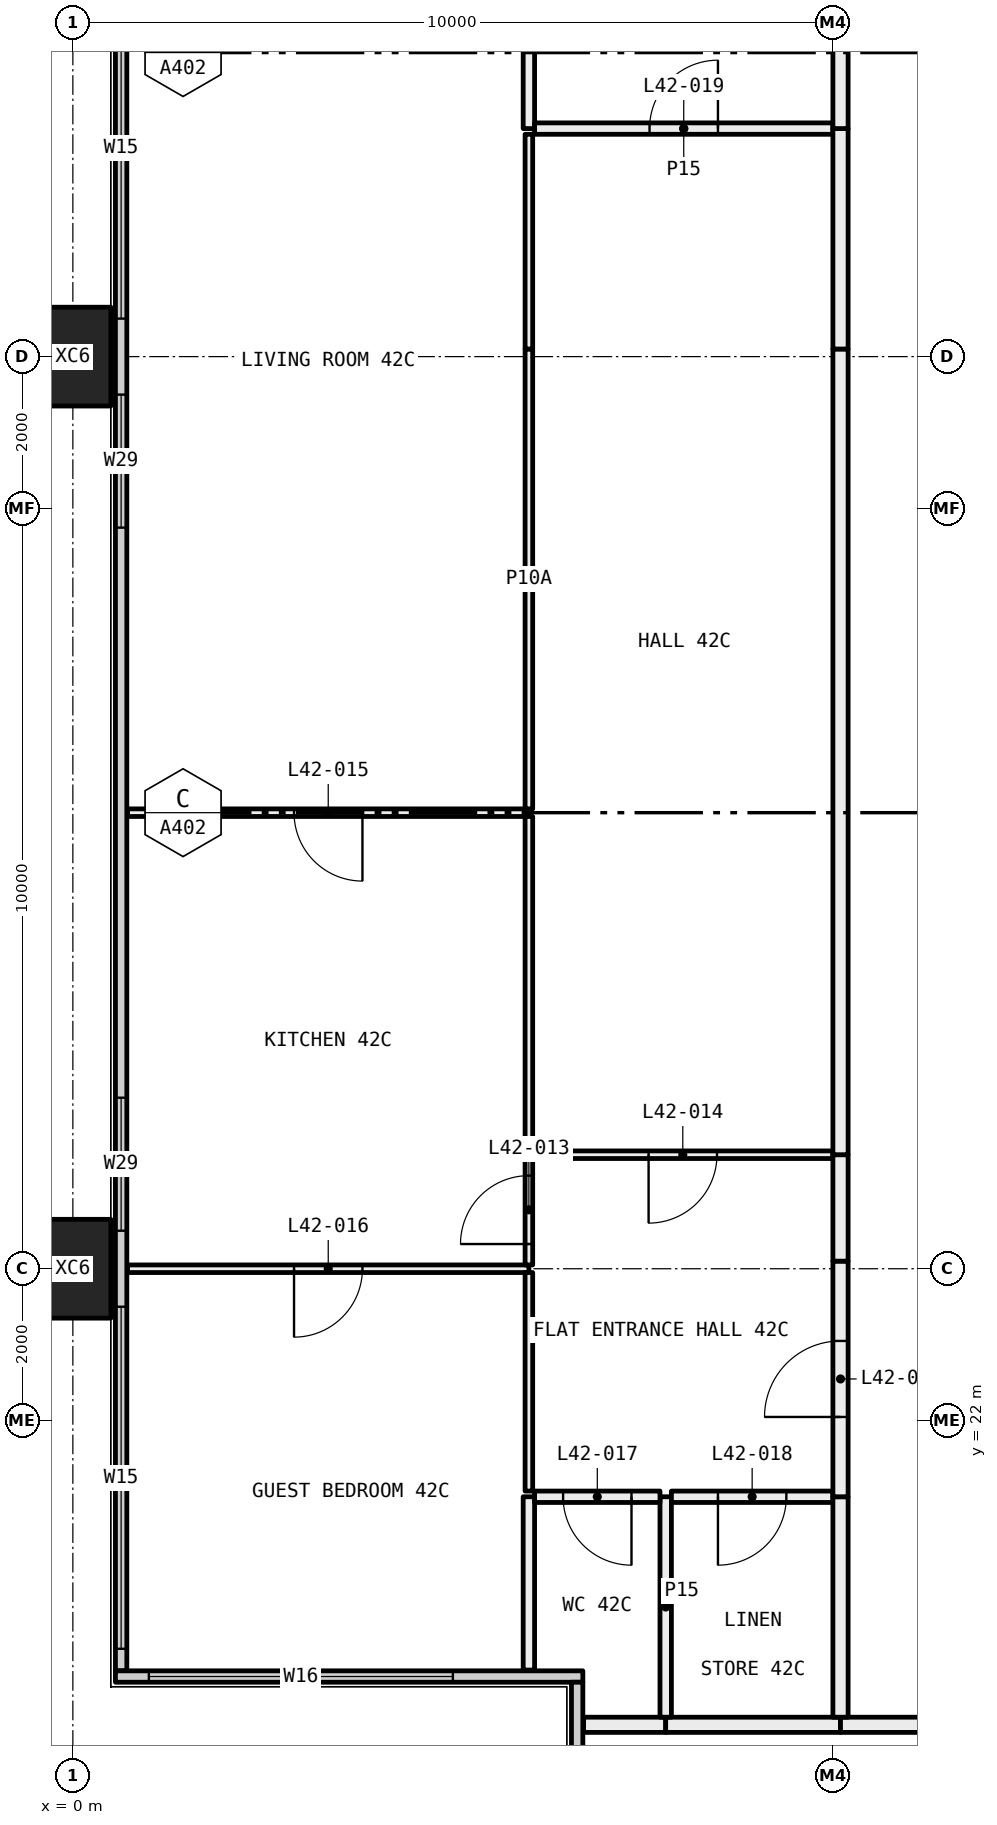
"""IFC4 building model, lengths in metres.
Left out: names, types, materials, properties, quantities, classifications, styles, units other than length and angle.
Written with IfcOpenShell. Run it as: python <this file> out.ifc"""

import sys

from ifc_helpers import new_model, si_unit, direction, frame, frame_2d, origin, origin_2d, place, context, subcontext, project, spatial, rectangle, hollow_rectangle, extrude, element, fill, save


model = new_model("IFC4")
c1 = context("Model", 3, precision=1e-05, world=origin(), true_north=direction((0.0, 1.0)))
c2 = subcontext(c1, "Body", "Model", "MODEL_VIEW")
j1 = project(units=[si_unit("LENGTHUNIT", "METRE"), si_unit("PLANEANGLEUNIT", "RADIAN")], contexts=[c1])
p1 = place(None, origin())
s1 = spatial("IfcSite", under=j1, at=p1, CompositionType="ELEMENT")
p2 = place(p1, origin())
s2 = spatial("IfcBuilding", under=s1, at=p2, CompositionType="ELEMENT")
p3 = place(p2, frame((0.0, 0.0, 161.7)))
s3 = spatial("IfcBuildingStorey", under=s2, at=p3, CompositionType="ELEMENT", Elevation=161.7)
for number, where, z_axis, x_axis in (
    (1, (0.0, 24.0, -0.4), (0.0, 0.0, 1.0), (0.0, 1.0, 0.0)),
    (2, (0.0, 36.0, -0.4), (0.0, 0.0, 1.0), (0.0, 1.0, 0.0)),
):
    element("IfcColumn", number, at=place(p3, frame(where, z_axis=z_axis, x_axis=x_axis)), inside=s3, PredefinedType="COLUMN", context=c2, shape_type="SweptSolid", body=[
        extrude(hollow_rectangle(XDim=1.3, YDim=1.0, WallThickness=0.05, at=origin_2d()), origin(), (0.0, 0.0, 1.0), 3.45),
    ])
p4 = place(p3, frame((0.635, 18.71, 0.0), z_axis=(0.0, 0.0, 1.0), x_axis=(0.0, 1.0, 0.0)))
e3 = element("IfcWall", 3, at=p4, inside=s3, PredefinedType="ELEMENTEDWALL", context=c2, shape_type="SweptSolid", body=[
    extrude(rectangle(XDim=22.58, YDim=0.15, at=frame_2d((11.29, 0.0))), origin(), (0.0, 0.0, 1.0), 3.05),
])
p5 = place(p4, frame((0.29, 0.0, 0.45)))
e4 = element("IfcOpeningElement", 4, at=p5, cuts=e3, PredefinedType="OPENING", context=c2, shape_type="SweptSolid", body=[
    extrude(rectangle(XDim=4.5, YDim=2.55, at=frame_2d((2.25, 1.275))), frame((0.0, 0.085, 0.0), z_axis=(0.0, -1.0, 0.0), x_axis=(1.0, 0.0, 0.0)), (0.0, 0.0, 1.0), 0.17),
])
p6 = place(p4, frame((5.79, 0.0, 0.45)))
e5 = element("IfcOpeningElement", 5, at=p6, cuts=e3, PredefinedType="OPENING", context=c2, shape_type="SweptSolid", body=[
    extrude(rectangle(XDim=1.75, YDim=2.55, at=frame_2d((0.875, 1.275))), frame((0.0, 0.085, 0.0), z_axis=(0.0, -1.0, 0.0), x_axis=(1.0, 0.0, 0.0)), (0.0, 0.0, 1.0), 0.17),
])
p7 = place(p4, frame((15.04, 0.0, 0.45)))
e6 = element("IfcOpeningElement", 6, at=p7, cuts=e3, PredefinedType="OPENING", context=c2, shape_type="SweptSolid", body=[
    extrude(rectangle(XDim=1.75, YDim=2.55, at=frame_2d((0.875, 1.275))), frame((0.0, 0.085, 0.0), z_axis=(0.0, -1.0, 0.0), x_axis=(1.0, 0.0, 0.0)), (0.0, 0.0, 1.0), 0.17),
])
p8 = place(p4, frame((17.79, 0.0, 0.45)))
e7 = element("IfcOpeningElement", 7, at=p8, cuts=e3, PredefinedType="OPENING", context=c2, shape_type="SweptSolid", body=[
    extrude(rectangle(XDim=4.5, YDim=2.55, at=frame_2d((2.25, 1.275))), frame((0.0, 0.085, 0.0), z_axis=(0.0, -1.0, 0.0), x_axis=(1.0, 0.0, 0.0)), (0.0, 0.0, 1.0), 0.17),
])
p9 = place(p3, frame((0.56, 18.635, 0.0), z_axis=(0.0, 0.0, 1.0), x_axis=(1.0, 0.0, 0.0)))
e8 = element("IfcWall", 8, at=p9, inside=s3, PredefinedType="ELEMENTEDWALL", context=c2, shape_type="SweptSolid", body=[
    extrude(rectangle(XDim=6.15, YDim=0.15, at=frame_2d((3.075, 0.0))), origin(), (0.0, 0.0, 1.0), 3.05),
])
p10 = place(p9, frame((0.44, 0.0, 0.45)))
e9 = element("IfcOpeningElement", 9, at=p10, cuts=e8, PredefinedType="OPENING", context=c2, shape_type="SweptSolid", body=[
    extrude(rectangle(XDim=4.0, YDim=2.55, at=frame_2d((2.0, 1.275))), frame((0.0, 0.085, 0.0), z_axis=(0.0, -1.0, 0.0), x_axis=(1.0, 0.0, 0.0)), (0.0, 0.0, 1.0), 0.17),
])
p11 = place(p3, frame((6.635, 12.71, 0.0), z_axis=(0.0, 0.0, 1.0), x_axis=(0.0, 1.0, 0.0)))
e10 = element("IfcWall", 10, at=p11, inside=s3, PredefinedType="ELEMENTEDWALL", context=c2, shape_type="SweptSolid", body=[
    extrude(rectangle(XDim=5.85, YDim=0.15, at=frame_2d((2.925, 0.0))), origin(), (0.0, 0.0, 1.0), 3.05),
])
p12 = place(p11, frame((0.29, 0.0, 0.45)))
e11 = element("IfcOpeningElement", 11, at=p12, cuts=e10, PredefinedType="OPENING", context=c2, shape_type="SweptSolid", body=[
    extrude(rectangle(XDim=4.0, YDim=2.55, at=frame_2d((2.0, 1.275))), frame((0.0, 0.085, 0.0), z_axis=(0.0, -1.0, 0.0), x_axis=(1.0, 0.0, 0.0)), (0.0, 0.0, 1.0), 0.17),
])
p13 = place(p3, frame((7.8, 18.0, 0.0), z_axis=(0.0, 0.0, 1.0), x_axis=(-1.0, 0.0, 0.0)))
e12 = element("IfcWall", 12, at=p13, inside=s3, PredefinedType="PARTITIONING", context=c2, shape_type="SweptSolid", body=[
    extrude(rectangle(XDim=1.08, YDim=0.2, at=frame_2d((0.54, 0.0))), origin(), (0.0, 0.0, 1.0), 3.05),
])
p14 = place(p3, frame((10.1, 18.0, 0.0), z_axis=(0.0, 0.0, 1.0), x_axis=(-1.0, 0.0, 0.0)))
e13 = element("IfcWall", 13, at=p14, inside=s3, PredefinedType="PARTITIONING", context=c2, shape_type="SweptSolid", body=[
    extrude(rectangle(XDim=2.3, YDim=0.2, at=frame_2d((1.15, 0.0))), origin(), (0.0, 0.0, 1.0), 3.05),
])
p15 = place(p3, frame((12.0, 18.0, 0.0), z_axis=(0.0, 0.0, 1.0), x_axis=(-1.0, 0.0, 0.0)))
e14 = element("IfcWall", 14, at=p15, inside=s3, PredefinedType="PARTITIONING", context=c2, shape_type="SweptSolid", body=[
    extrude(rectangle(XDim=1.9, YDim=0.2, at=frame_2d((0.95, 0.0))), origin(), (0.0, 0.0, 1.0), 3.05),
])
p16 = place(p3, frame((6.0, 24.0, 0.0), z_axis=(0.0, 0.0, 1.0), x_axis=(-1.0, 0.0, 0.0)))
e15 = element("IfcWall", 15, at=p16, inside=s3, PredefinedType="PARTITIONING", context=c2, shape_type="SweptSolid", body=[
    extrude(rectangle(XDim=5.28, YDim=0.1, at=frame_2d((2.64, 0.0))), origin(), (0.0, 0.0, 1.0), 2.45),
])
p17 = place(p16, frame((2.19, 0.0, 0.0)))
e16 = element("IfcOpeningElement", 16, at=p17, cuts=e15, PredefinedType="OPENING", context=c2, shape_type="SweptSolid", body=[
    extrude(rectangle(XDim=0.9, YDim=2.1, at=frame_2d((0.45, 1.05))), frame((0.0, 0.06, 0.0), z_axis=(0.0, -1.0, 0.0), x_axis=(1.0, 0.0, 0.0)), (0.0, 0.0, 1.0), 0.12),
])
p18 = place(p3, frame((6.0, 18.72, 0.0), z_axis=(0.0, 0.0, 1.0), x_axis=(0.0, 1.0, 0.0)))
e17 = element("IfcWall", 17, at=p18, inside=s3, PredefinedType="PARTITIONING", context=c2, shape_type="SweptSolid", body=[
    extrude(rectangle(XDim=2.28, YDim=0.15, at=frame_2d((1.14, 0.0))), origin(), (0.0, 0.0, 1.0), 3.05),
])
p19 = place(p3, frame((6.0, 21.075, 0.0), z_axis=(0.0, 0.0, 1.0), x_axis=(0.0, 1.0, 0.0)))
e18 = element("IfcWall", 18, at=p19, inside=s3, PredefinedType="PARTITIONING", context=c2, shape_type="SweptSolid", body=[
    extrude(rectangle(XDim=2.875, YDim=0.1, at=frame_2d((1.438, 0.0))), origin(), (0.0, 0.0, 1.0), 2.45),
])
p20 = place(p3, frame((6.0, 30.0, 0.0), z_axis=(0.0, 0.0, 1.0), x_axis=(-1.0, 0.0, 0.0)))
e19 = element("IfcWall", 19, at=p20, inside=s3, PredefinedType="PARTITIONING", context=c2, shape_type="SweptSolid", body=[
    extrude(rectangle(XDim=5.28, YDim=0.1, at=frame_2d((2.64, 0.0))), origin(), (0.0, 0.0, 1.0), 3.05),
])
p21 = place(p20, frame((2.19, 0.0, 0.0)))
e20 = element("IfcOpeningElement", 20, at=p21, cuts=e19, PredefinedType="OPENING", context=c2, shape_type="SweptSolid", body=[
    extrude(rectangle(XDim=0.9, YDim=2.1, at=frame_2d((0.45, 1.05))), frame((0.0, 0.06, 0.0), z_axis=(0.0, -1.0, 0.0), x_axis=(1.0, 0.0, 0.0)), (0.0, 0.0, 1.0), 0.12),
])
p22 = place(p3, frame((6.0, 24.05, 0.0), z_axis=(0.0, 0.0, 1.0), x_axis=(0.0, 1.0, 0.0)))
e21 = element("IfcWall", 21, at=p22, inside=s3, PredefinedType="PARTITIONING", context=c2, shape_type="SweptSolid", body=[
    extrude(rectangle(XDim=1.45, YDim=0.1, at=frame_2d((0.725, 0.0))), origin(), (0.0, 0.0, 1.0), 2.45),
])
p23 = place(p22, frame((0.275, 0.0, 0.0)))
e22 = element("IfcOpeningElement", 22, at=p23, cuts=e21, PredefinedType="OPENING", context=c2, shape_type="SweptSolid", body=[
    extrude(rectangle(XDim=0.9, YDim=2.1, at=frame_2d((0.45, 1.05))), frame((0.0, 0.06, 0.0), z_axis=(0.0, -1.0, 0.0), x_axis=(1.0, 0.0, 0.0)), (0.0, 0.0, 1.0), 0.12),
])
p24 = place(p3, frame((6.0, 25.5, 0.0), z_axis=(0.0, 0.0, 1.0), x_axis=(0.0, 1.0, 0.0)))
e23 = element("IfcWall", 23, at=p24, inside=s3, PredefinedType="PARTITIONING", context=c2, shape_type="SweptSolid", body=[
    extrude(rectangle(XDim=4.45, YDim=0.1, at=frame_2d((2.225, 0.0))), origin(), (0.0, 0.0, 1.0), 3.05),
])
p25 = place(p3, frame((6.0, 30.05, 0.0), z_axis=(0.0, 0.0, 1.0), x_axis=(0.0, 1.0, 0.0)))
e24 = element("IfcWall", 24, at=p25, inside=s3, PredefinedType="PARTITIONING", context=c2, shape_type="SweptSolid", body=[
    extrude(rectangle(XDim=6.05, YDim=0.1, at=frame_2d((3.025, 0.0))), origin(), (0.0, 0.0, 1.0), 2.45),
])
p26 = place(p3, frame((6.0, 36.1, 0.0), z_axis=(0.0, 0.0, 1.0), x_axis=(0.0, 1.0, 0.0)))
e25 = element("IfcWall", 25, at=p26, inside=s3, PredefinedType="PARTITIONING", context=c2, shape_type="SweptSolid", body=[
    extrude(rectangle(XDim=2.825, YDim=0.1, at=frame_2d((1.413, 0.0))), origin(), (0.0, 0.0, 1.0), 3.05),
])
p27 = place(p3, frame((6.0, 39.0, 0.0), z_axis=(0.0, 0.0, 1.0), x_axis=(0.0, 1.0, 0.0)))
e26 = element("IfcWall", 26, at=p27, inside=s3, PredefinedType="PARTITIONING", context=c2, shape_type="SweptSolid", body=[
    extrude(rectangle(XDim=2.28, YDim=0.15, at=frame_2d((1.14, 0.0))), origin(), (0.0, 0.0, 1.0), 3.05),
])
p28 = place(p3, frame((7.8, 18.1, 0.0), z_axis=(0.0, 0.0, 1.0), x_axis=(0.0, 1.0, 0.0)))
e27 = element("IfcWall", 27, at=p28, inside=s3, PredefinedType="PARTITIONING", context=c2, shape_type="SweptSolid", body=[
    extrude(rectangle(XDim=2.9, YDim=0.15, at=frame_2d((1.45, 0.0))), origin(), (0.0, 0.0, 1.0), 3.05),
])
p29 = place(p3, frame((7.725, 21.0, 0.0), z_axis=(0.0, 0.0, 1.0), x_axis=(-1.0, 0.0, 0.0)))
e28 = element("IfcWall", 28, at=p29, inside=s3, PredefinedType="PARTITIONING", context=c2, shape_type="SweptSolid", body=[
    extrude(rectangle(XDim=1.65, YDim=0.15, at=frame_2d((0.825, 0.0))), origin(), (0.0, 0.0, 1.0), 3.05),
])
p30 = place(p29, frame((0.375, 0.0, 0.0)))
e29 = element("IfcOpeningElement", 29, at=p30, cuts=e28, PredefinedType="OPENING", context=c2, shape_type="SweptSolid", body=[
    extrude(rectangle(XDim=0.9, YDim=2.1, at=frame_2d((0.45, 1.05))), frame((0.0, 0.085, 0.0), z_axis=(0.0, -1.0, 0.0), x_axis=(1.0, 0.0, 0.0)), (0.0, 0.0, 1.0), 0.17),
])
p31 = place(p3, frame((10.0, 21.0, 0.0), z_axis=(0.0, 0.0, 1.0), x_axis=(-1.0, 0.0, 0.0)))
e30 = element("IfcWall", 30, at=p31, inside=s3, PredefinedType="PARTITIONING", context=c2, shape_type="SweptSolid", body=[
    extrude(rectangle(XDim=2.125, YDim=0.15, at=frame_2d((1.062, 0.0))), origin(), (0.0, 0.0, 1.0), 3.05),
])
p32 = place(p31, frame((0.613, 0.0, 0.0)))
e31 = element("IfcOpeningElement", 31, at=p32, cuts=e30, PredefinedType="OPENING", context=c2, shape_type="SweptSolid", body=[
    extrude(rectangle(XDim=0.9, YDim=2.1, at=frame_2d((0.45, 1.05))), frame((0.0, 0.085, 0.0), z_axis=(0.0, -1.0, 0.0), x_axis=(1.0, 0.0, 0.0)), (0.0, 0.0, 1.0), 0.17),
])
p33 = place(p3, frame((10.1, 18.1, 0.0), z_axis=(0.0, 0.0, 1.0), x_axis=(0.0, 1.0, 0.0)))
e32 = element("IfcWall", 32, at=p33, inside=s3, PredefinedType="PARTITIONING", context=c2, shape_type="SweptSolid", body=[
    extrude(rectangle(XDim=2.9, YDim=0.2, at=frame_2d((1.45, 0.0))), origin(), (0.0, 0.0, 1.0), 3.05),
])
p34 = place(p3, frame((10.0, 25.5, 0.0), z_axis=(0.0, 0.0, 1.0), x_axis=(-1.0, 0.0, 0.0)))
e33 = element("IfcWall", 33, at=p34, inside=s3, PredefinedType="PARTITIONING", context=c2, shape_type="SweptSolid", body=[
    extrude(rectangle(XDim=3.95, YDim=0.1, at=frame_2d((1.975, 0.0))), origin(), (0.0, 0.0, 1.0), 3.05),
])
p35 = place(p34, frame((1.525, 0.0, 0.0)))
e34 = element("IfcOpeningElement", 34, at=p35, cuts=e33, PredefinedType="OPENING", context=c2, shape_type="SweptSolid", body=[
    extrude(rectangle(XDim=0.9, YDim=2.1, at=frame_2d((0.45, 1.05))), frame((0.0, 0.06, 0.0), z_axis=(0.0, -1.0, 0.0), x_axis=(1.0, 0.0, 0.0)), (0.0, 0.0, 1.0), 0.12),
])
p36 = place(p3, frame((10.1, 21.0, 0.0), z_axis=(0.0, 0.0, 1.0), x_axis=(0.0, 1.0, 0.0)))
e35 = element("IfcWall", 35, at=p36, inside=s3, PredefinedType="PARTITIONING", context=c2, shape_type="SweptSolid", body=[
    extrude(rectangle(XDim=3.1, YDim=0.2, at=frame_2d((1.55, 0.0))), origin(), (0.0, 0.0, 1.0), 2.45),
])
p37 = place(p36, frame((1.05, 0.0, 0.0)))
e36 = element("IfcOpeningElement", 36, at=p37, cuts=e35, PredefinedType="OPENING", context=c2, shape_type="SweptSolid", body=[
    extrude(rectangle(XDim=1.0, YDim=2.1, at=frame_2d((0.5, 1.05))), frame((0.0, 0.11, 0.0), z_axis=(0.0, -1.0, 0.0), x_axis=(1.0, 0.0, 0.0)), (0.0, 0.0, 1.0), 0.22),
])
p38 = place(p3, frame((10.1, 24.1, 0.0), z_axis=(0.0, 0.0, 1.0), x_axis=(0.0, 1.0, 0.0)))
e37 = element("IfcWall", 37, at=p38, inside=s3, PredefinedType="PARTITIONING", context=c2, shape_type="SweptSolid", body=[
    extrude(rectangle(XDim=1.4, YDim=0.2, at=frame_2d((0.7, 0.0))), origin(), (0.0, 0.0, 1.0), 3.05),
])
p39 = place(p3, frame((10.0, 39.0, 0.0), z_axis=(0.0, 0.0, 1.0), x_axis=(-1.0, 0.0, 0.0)))
e38 = element("IfcWall", 38, at=p39, inside=s3, PredefinedType="PARTITIONING", context=c2, shape_type="SweptSolid", body=[
    extrude(rectangle(XDim=3.925, YDim=0.15, at=frame_2d((1.962, 0.0))), origin(), (0.0, 0.0, 1.0), 3.05),
])
p40 = place(p39, frame((1.512, 0.0, 0.0)))
e39 = element("IfcOpeningElement", 39, at=p40, cuts=e38, PredefinedType="OPENING", context=c2, shape_type="SweptSolid", body=[
    extrude(rectangle(XDim=0.9, YDim=2.1, at=frame_2d((0.45, 1.05))), frame((0.0, 0.085, 0.0), z_axis=(0.0, -1.0, 0.0), x_axis=(1.0, 0.0, 0.0)), (0.0, 0.0, 1.0), 0.17),
])
p41 = place(p3, frame((10.1, 25.5, 0.0), z_axis=(0.0, 0.0, 1.0), x_axis=(0.0, 1.0, 0.0)))
e40 = element("IfcWall", 40, at=p41, inside=s3, PredefinedType="PARTITIONING", context=c2, shape_type="SweptSolid", body=[
    extrude(rectangle(XDim=10.6, YDim=0.2, at=frame_2d((5.3, 0.0))), origin(), (0.0, 0.0, 1.0), 2.45),
])
for number, where, z_axis, x_axis in (
    (41, (10.1, 36.1, 0.0), (0.0, 0.0, 1.0), (0.0, 1.0, 0.0)),
    (42, (10.1, 39.0, 0.0), (0.0, 0.0, 1.0), (0.0, 1.0, 0.0)),
):
    element("IfcWall", number, at=place(p3, frame(where, z_axis=z_axis, x_axis=x_axis)), inside=s3, PredefinedType="PARTITIONING", context=c2, shape_type="SweptSolid", body=[
        extrude(rectangle(XDim=2.9, YDim=0.2, at=frame_2d((1.45, 0.0))), origin(), (0.0, 0.0, 1.0), 3.05),
    ])
p42 = place(p5, origin())
e43 = element("IfcWindow", 43, at=p42, inside=s3, PartitioningType="SINGLE_PANEL", PredefinedType="WINDOW", context=c2, shape_type="SweptSolid", body=[
    extrude(rectangle(XDim=4.5, YDim=2.55, at=frame_2d((2.25, 1.275))), frame((0.0, 0.03, 0.0), z_axis=(0.0, -1.0, 0.0), x_axis=(1.0, 0.0, 0.0)), (0.0, 0.0, 1.0), 0.06),
])
fill(e4, e43)
p43 = place(p6, origin())
e44 = element("IfcWindow", 44, at=p43, inside=s3, PartitioningType="SINGLE_PANEL", PredefinedType="WINDOW", context=c2, shape_type="SweptSolid", body=[
    extrude(rectangle(XDim=1.75, YDim=2.55, at=frame_2d((0.875, 1.275))), frame((0.0, 0.03, 0.0), z_axis=(0.0, -1.0, 0.0), x_axis=(1.0, 0.0, 0.0)), (0.0, 0.0, 1.0), 0.06),
])
fill(e5, e44)
p44 = place(p7, origin())
e45 = element("IfcWindow", 45, at=p44, inside=s3, PartitioningType="SINGLE_PANEL", PredefinedType="WINDOW", context=c2, shape_type="SweptSolid", body=[
    extrude(rectangle(XDim=1.75, YDim=2.55, at=frame_2d((0.875, 1.275))), frame((0.0, 0.03, 0.0), z_axis=(0.0, -1.0, 0.0), x_axis=(1.0, 0.0, 0.0)), (0.0, 0.0, 1.0), 0.06),
])
fill(e6, e45)
p45 = place(p8, origin())
e46 = element("IfcWindow", 46, at=p45, inside=s3, PartitioningType="SINGLE_PANEL", PredefinedType="WINDOW", context=c2, shape_type="SweptSolid", body=[
    extrude(rectangle(XDim=4.5, YDim=2.55, at=frame_2d((2.25, 1.275))), frame((0.0, 0.03, 0.0), z_axis=(0.0, -1.0, 0.0), x_axis=(1.0, 0.0, 0.0)), (0.0, 0.0, 1.0), 0.06),
])
fill(e7, e46)
p46 = place(p10, origin())
e47 = element("IfcWindow", 47, at=p46, inside=s3, PartitioningType="SINGLE_PANEL", PredefinedType="WINDOW", context=c2, shape_type="SweptSolid", body=[
    extrude(rectangle(XDim=4.0, YDim=2.55, at=frame_2d((2.0, 1.275))), frame((0.0, 0.03, 0.0), z_axis=(0.0, -1.0, 0.0), x_axis=(1.0, 0.0, 0.0)), (0.0, 0.0, 1.0), 0.06),
])
fill(e9, e47)
p47 = place(p37, origin())
e48 = element("IfcDoor", 48, at=p47, inside=s3, OperationType="SINGLE_SWING_RIGHT", PredefinedType="DOOR", context=c2, shape_type="SweptSolid", body=[
    extrude(rectangle(XDim=1.0, YDim=2.1, at=frame_2d((0.5, 1.05))), frame((0.0, 0.025, 0.0), z_axis=(0.0, -1.0, 0.0), x_axis=(1.0, 0.0, 0.0)), (0.0, 0.0, 1.0), 0.05),
])
fill(e36, e48)
p48 = place(p23, origin())
e49 = element("IfcDoor", 49, at=p48, inside=s3, OperationType="SINGLE_SWING_RIGHT", PredefinedType="DOOR", context=c2, shape_type="SweptSolid", body=[
    extrude(rectangle(XDim=0.9, YDim=2.1, at=frame_2d((0.45, 1.05))), frame((0.0, 0.025, 0.0), z_axis=(0.0, -1.0, 0.0), x_axis=(1.0, 0.0, 0.0)), (0.0, 0.0, 1.0), 0.05),
])
fill(e22, e49)
p49 = place(p35, origin())
e50 = element("IfcDoor", 50, at=p49, inside=s3, OperationType="SINGLE_SWING_LEFT", PredefinedType="DOOR", context=c2, shape_type="SweptSolid", body=[
    extrude(rectangle(XDim=0.9, YDim=2.1, at=frame_2d((0.45, 1.05))), frame((0.0, 0.025, 0.0), z_axis=(0.0, -1.0, 0.0), x_axis=(1.0, 0.0, 0.0)), (0.0, 0.0, 1.0), 0.05),
])
fill(e34, e50)
p50 = place(p21, origin())
e51 = element("IfcDoor", 51, at=p50, inside=s3, OperationType="SINGLE_SWING_RIGHT", PredefinedType="DOOR", context=c2, shape_type="SweptSolid", body=[
    extrude(rectangle(XDim=0.9, YDim=2.1, at=frame_2d((0.45, 1.05))), frame((0.0, 0.025, 0.0), z_axis=(0.0, -1.0, 0.0), x_axis=(1.0, 0.0, 0.0)), (0.0, 0.0, 1.0), 0.05),
])
fill(e20, e51)
p51 = place(p17, origin())
e52 = element("IfcDoor", 52, at=p51, inside=s3, OperationType="SINGLE_SWING_LEFT", PredefinedType="DOOR", context=c2, shape_type="SweptSolid", body=[
    extrude(rectangle(XDim=0.9, YDim=2.1, at=frame_2d((0.45, 1.05))), frame((0.0, 0.025, 0.0), z_axis=(0.0, -1.0, 0.0), x_axis=(1.0, 0.0, 0.0)), (0.0, 0.0, 1.0), 0.05),
])
fill(e16, e52)
p52 = place(p30, origin())
e53 = element("IfcDoor", 53, at=p52, inside=s3, OperationType="SINGLE_SWING_RIGHT", PredefinedType="DOOR", context=c2, shape_type="SweptSolid", body=[
    extrude(rectangle(XDim=0.9, YDim=2.1, at=frame_2d((0.45, 1.05))), frame((0.0, 0.025, 0.0), z_axis=(0.0, -1.0, 0.0), x_axis=(1.0, 0.0, 0.0)), (0.0, 0.0, 1.0), 0.05),
])
fill(e29, e53)
p53 = place(p32, origin())
e54 = element("IfcDoor", 54, at=p53, inside=s3, OperationType="SINGLE_SWING_LEFT", PredefinedType="DOOR", context=c2, shape_type="SweptSolid", body=[
    extrude(rectangle(XDim=0.9, YDim=2.1, at=frame_2d((0.45, 1.05))), frame((0.0, 0.025, 0.0), z_axis=(0.0, -1.0, 0.0), x_axis=(1.0, 0.0, 0.0)), (0.0, 0.0, 1.0), 0.05),
])
fill(e31, e54)
p54 = place(p40, frame((0.9, 0.0, 0.0), x_axis=(-1.0, 0.0, 0.0)))
e55 = element("IfcDoor", 55, at=p54, inside=s3, OperationType="SINGLE_SWING_LEFT", PredefinedType="DOOR", context=c2, shape_type="SweptSolid", body=[
    extrude(rectangle(XDim=0.9, YDim=2.1, at=frame_2d((0.45, 1.05))), frame((0.0, 0.025, 0.0), z_axis=(0.0, -1.0, 0.0), x_axis=(1.0, 0.0, 0.0)), (0.0, 0.0, 1.0), 0.05),
])
fill(e39, e55)
save(model, sys.argv[1])
